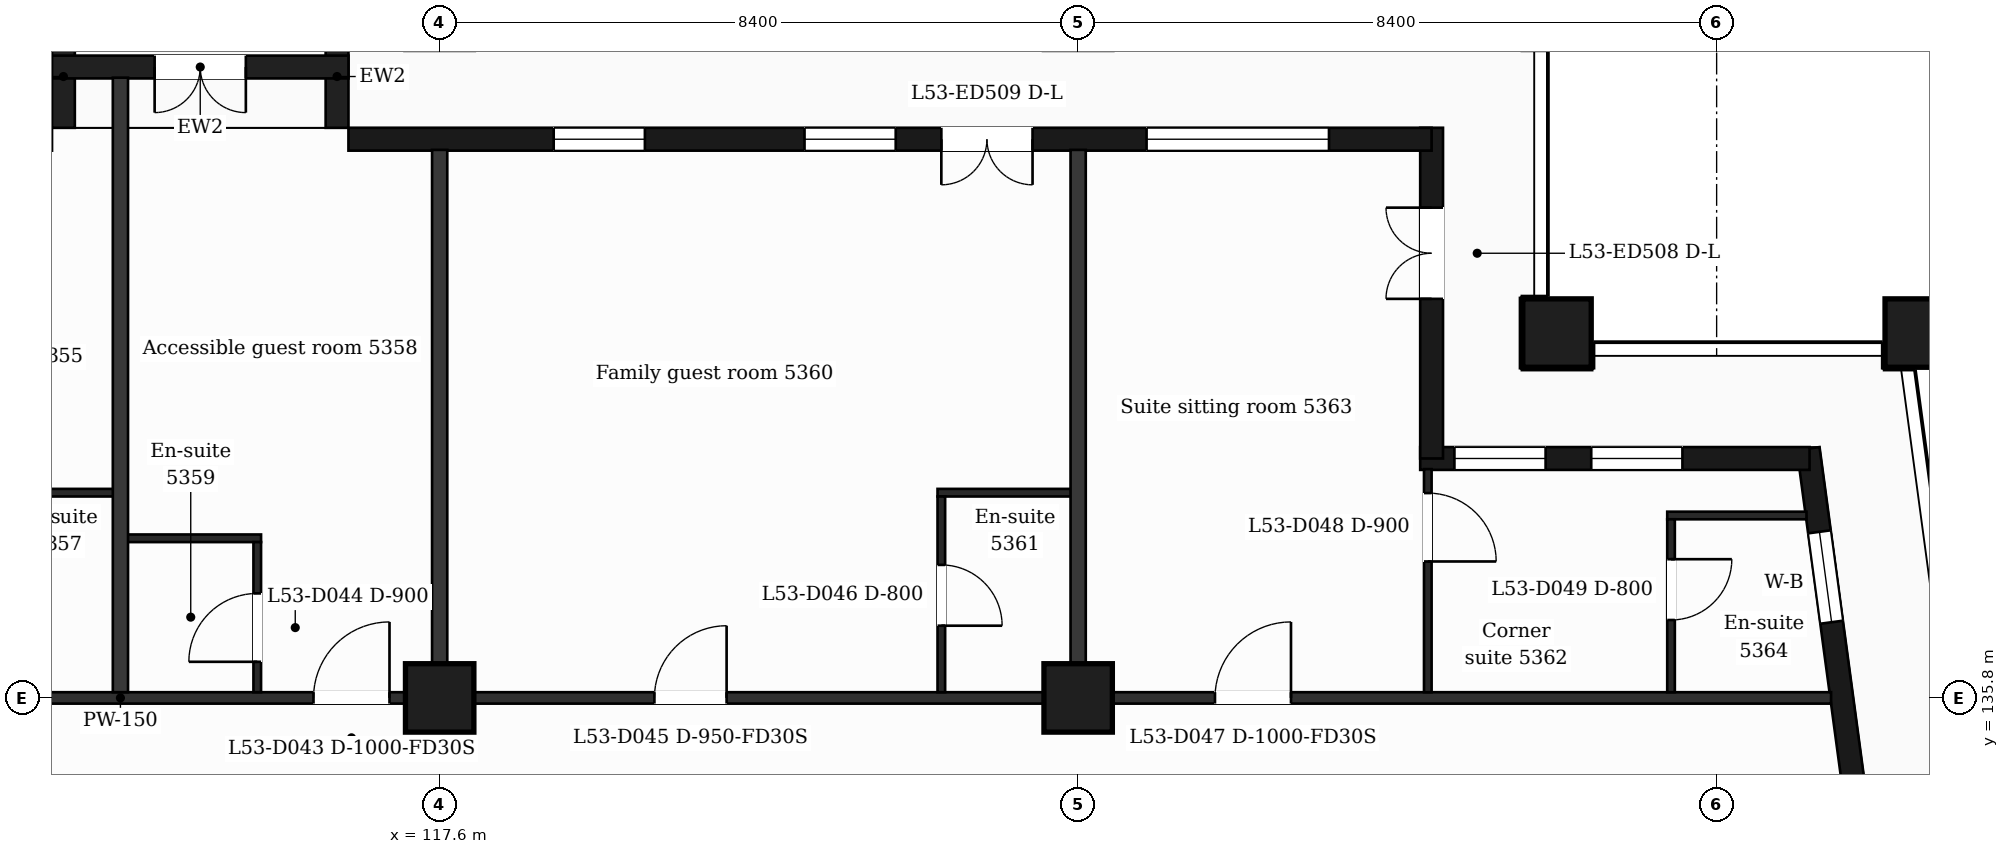
"""IFC4 building model, lengths in metres.
Left out: names, types, materials, properties, quantities, classifications, styles, units other than length and angle.
Written with IfcOpenShell. Run it as: python <this file> out.ifc"""

import sys

from ifc_helpers import new_model, si_unit, direction, frame, frame_2d, origin, origin_2d, place, context, subcontext, project, spatial, rectangle, extrude, element, fill, save


model = new_model("IFC4")
c1 = context("Model", 3, precision=1e-05, world=origin(), true_north=direction((0.0, 1.0)))
c2 = subcontext(c1, "Body", "Model", "MODEL_VIEW")
j1 = project(units=[si_unit("LENGTHUNIT", "METRE"), si_unit("PLANEANGLEUNIT", "RADIAN")], contexts=[c1])
p1 = place(None, origin())
s1 = spatial("IfcSite", under=j1, at=p1, CompositionType="ELEMENT")
p2 = place(p1, origin())
s2 = spatial("IfcBuilding", under=s1, at=p2, CompositionType="ELEMENT")
p3 = place(p2, frame((0.0, 0.0, 220.7)))
s3 = spatial("IfcBuildingStorey", under=s2, at=p3, CompositionType="ELEMENT", Elevation=220.7)
for number, where, z_axis, x_axis in (
    (1, (132.3, 140.6, 0.0), (0.0, 0.0, 1.0), (1.0, 0.0, 0.0)),
    (2, (137.065, 140.6, 0.0), (0.0, 0.0, 1.0), (1.0, 0.0, 0.0)),
    (3, (117.6, 135.8, 0.0), (0.0, 0.0, 1.0), (1.0, 0.0, 0.0)),
    (4, (126.0, 135.8, 0.0), (0.0, 0.0, 1.0), (1.0, 0.0, 0.0)),
):
    element("IfcColumn", number, at=place(p3, frame(where, z_axis=z_axis, x_axis=x_axis)), inside=s3, PredefinedType="COLUMN", context=c2, shape_type="SweptSolid", body=[
        extrude(rectangle(XDim=0.9, YDim=0.9, at=origin_2d()), origin(), (0.0, 0.0, 1.0), 3.7),
    ])
p4 = place(p3, frame((136.504, 132.4, 0.0), z_axis=(0.0, 0.0, 1.0), x_axis=(-0.133399697462, 0.99106231929, 0.0)))
e5 = element("IfcWall", 5, at=p4, inside=s3, PredefinedType="SOLIDWALL", context=c2, shape_type="SweptSolid", body=[
    extrude(rectangle(XDim=6.74, YDim=0.3, at=frame_2d((3.37, 0.0))), origin(), (0.0, 0.0, 1.0), 3.38),
])
p5 = place(p4, frame((1.115, 0.0, 0.0)))
e6 = element("IfcOpeningElement", 6, at=p5, cuts=e5, PredefinedType="OPENING", context=c2, shape_type="SweptSolid", body=[
    extrude(rectangle(XDim=1.2, YDim=2.4, at=frame_2d((0.6, 1.2))), frame((0.0, 0.16, 0.0), z_axis=(0.0, -1.0, 0.0), x_axis=(1.0, 0.0, 0.0)), (0.0, 0.0, 1.0), 0.32),
])
p6 = place(p4, frame((4.436, 0.0, 0.9)))
e7 = element("IfcOpeningElement", 7, at=p6, cuts=e5, PredefinedType="OPENING", context=c2, shape_type="SweptSolid", body=[
    extrude(rectangle(XDim=1.2, YDim=2.1, at=frame_2d((0.6, 1.05))), frame((0.0, 0.16, 0.0), z_axis=(0.0, -1.0, 0.0), x_axis=(1.0, 0.0, 0.0)), (0.0, 0.0, 1.0), 0.32),
])
p7 = place(p3, frame((135.623, 138.95, 0.0), z_axis=(0.0, 0.0, 1.0), x_axis=(-1.0, 0.0, 0.0)))
e8 = element("IfcWall", 8, at=p7, inside=s3, PredefinedType="SOLIDWALL", context=c2, shape_type="SweptSolid", body=[
    extrude(rectangle(XDim=5.123, YDim=0.3, at=frame_2d((2.561, 0.0))), origin(), (0.0, 0.0, 1.0), 3.38),
])
p8 = place(p7, frame((1.673, 0.0, 0.9)))
e9 = element("IfcOpeningElement", 9, at=p8, cuts=e8, PredefinedType="OPENING", context=c2, shape_type="SweptSolid", body=[
    extrude(rectangle(XDim=1.2, YDim=2.1, at=frame_2d((0.6, 1.05))), frame((0.0, 0.16, 0.0), z_axis=(0.0, -1.0, 0.0), x_axis=(1.0, 0.0, 0.0)), (0.0, 0.0, 1.0), 0.32),
])
p9 = place(p7, frame((3.473, 0.0, 0.9)))
e10 = element("IfcOpeningElement", 10, at=p9, cuts=e8, PredefinedType="OPENING", context=c2, shape_type="SweptSolid", body=[
    extrude(rectangle(XDim=1.2, YDim=2.1, at=frame_2d((0.6, 1.05))), frame((0.0, 0.16, 0.0), z_axis=(0.0, -1.0, 0.0), x_axis=(1.0, 0.0, 0.0)), (0.0, 0.0, 1.0), 0.32),
])
p10 = place(p3, frame((130.65, 138.95, 0.0), z_axis=(0.0, 0.0, 1.0), x_axis=(0.0, 1.0, 0.0)))
e11 = element("IfcWall", 11, at=p10, inside=s3, PredefinedType="SOLIDWALL", context=c2, shape_type="SweptSolid", body=[
    extrude(rectangle(XDim=4.35, YDim=0.3, at=frame_2d((2.175, 0.0))), origin(), (0.0, 0.0, 1.0), 3.38),
])
p11 = place(p10, frame((2.1, 0.0, 0.0)))
e12 = element("IfcOpeningElement", 12, at=p11, cuts=e11, PredefinedType="OPENING", context=c2, shape_type="SweptSolid", body=[
    extrude(rectangle(XDim=1.2, YDim=2.4, at=frame_2d((0.6, 1.2))), frame((0.0, 0.16, 0.0), z_axis=(0.0, -1.0, 0.0), x_axis=(1.0, 0.0, 0.0)), (0.0, 0.0, 1.0), 0.32),
])
p12 = place(p3, frame((130.65, 143.15, 0.0), z_axis=(0.0, 0.0, 1.0), x_axis=(-1.0, 0.0, 0.0)))
e13 = element("IfcWall", 13, at=p12, inside=s3, PredefinedType="SOLIDWALL", context=c2, shape_type="SweptSolid", body=[
    extrude(rectangle(XDim=14.25, YDim=0.3, at=frame_2d((7.125, 0.0))), origin(), (0.0, 0.0, 1.0), 3.38),
])
p13 = place(p12, frame((1.35, 0.0, 0.9)))
e14 = element("IfcOpeningElement", 14, at=p13, cuts=e13, PredefinedType="OPENING", context=c2, shape_type="SweptSolid", body=[
    extrude(rectangle(XDim=2.4, YDim=2.1, at=frame_2d((1.2, 1.05))), frame((0.0, 0.16, 0.0), z_axis=(0.0, -1.0, 0.0), x_axis=(1.0, 0.0, 0.0)), (0.0, 0.0, 1.0), 0.32),
])
p14 = place(p12, frame((5.25, 0.0, 0.0)))
e15 = element("IfcOpeningElement", 15, at=p14, cuts=e13, PredefinedType="OPENING", context=c2, shape_type="SweptSolid", body=[
    extrude(rectangle(XDim=1.2, YDim=2.4, at=frame_2d((0.6, 1.2))), frame((0.0, 0.16, 0.0), z_axis=(0.0, -1.0, 0.0), x_axis=(1.0, 0.0, 0.0)), (0.0, 0.0, 1.0), 0.32),
])
p15 = place(p12, frame((7.05, 0.0, 0.9)))
e16 = element("IfcOpeningElement", 16, at=p15, cuts=e13, PredefinedType="OPENING", context=c2, shape_type="SweptSolid", body=[
    extrude(rectangle(XDim=1.2, YDim=2.1, at=frame_2d((0.6, 1.05))), frame((0.0, 0.16, 0.0), z_axis=(0.0, -1.0, 0.0), x_axis=(1.0, 0.0, 0.0)), (0.0, 0.0, 1.0), 0.32),
])
p16 = place(p12, frame((10.35, 0.0, 0.9)))
e17 = element("IfcOpeningElement", 17, at=p16, cuts=e13, PredefinedType="OPENING", context=c2, shape_type="SweptSolid", body=[
    extrude(rectangle(XDim=1.2, YDim=2.1, at=frame_2d((0.6, 1.05))), frame((0.0, 0.16, 0.0), z_axis=(0.0, -1.0, 0.0), x_axis=(1.0, 0.0, 0.0)), (0.0, 0.0, 1.0), 0.32),
])
for number, where, z_axis, x_axis in (
    (18, (116.25, 143.3, 0.0), (0.0, 0.0, 1.0), (0.0, 1.0, 0.0)),
    (19, (112.65, 143.3, 0.0), (0.0, 0.0, 1.0), (0.0, 1.0, 0.0)),
):
    element("IfcWall", number, at=place(p3, frame(where, z_axis=z_axis, x_axis=x_axis)), inside=s3, PredefinedType="SOLIDWALL", context=c2, shape_type="SweptSolid", body=[
        extrude(rectangle(XDim=1.35, YDim=0.3, at=frame_2d((0.675, 0.0))), origin(), (0.0, 0.0, 1.0), 3.38),
    ])
p17 = place(p3, frame((116.4, 144.1, 0.0), z_axis=(0.0, 0.0, 1.0), x_axis=(-1.0, 0.0, 0.0)))
e20 = element("IfcWall", 20, at=p17, inside=s3, PredefinedType="SOLIDWALL", context=c2, shape_type="SweptSolid", body=[
    extrude(rectangle(XDim=3.9, YDim=0.3, at=frame_2d((1.95, 0.0))), origin(), (0.0, 0.0, 1.0), 3.38),
])
p18 = place(p17, frame((1.35, 0.0, 0.0)))
e21 = element("IfcOpeningElement", 21, at=p18, cuts=e20, PredefinedType="OPENING", context=c2, shape_type="SweptSolid", body=[
    extrude(rectangle(XDim=1.2, YDim=2.4, at=frame_2d((0.6, 1.2))), frame((0.0, 0.16, 0.0), z_axis=(0.0, -1.0, 0.0), x_axis=(1.0, 0.0, 0.0)), (0.0, 0.0, 1.0), 0.32),
])
p19 = place(p3, frame((90.895, 135.8, 0.0), z_axis=(0.0, 0.0, 1.0), x_axis=(1.0, 0.0, 0.0)))
e22 = element("IfcWall", 22, at=p19, inside=s3, PredefinedType="PARTITIONING", context=c2, shape_type="SweptSolid", body=[
    extrude(rectangle(XDim=45.011, YDim=0.15, at=frame_2d((22.505, 0.0))), origin(), (0.0, 0.0, 1.0), 3.38),
])
p20 = place(p19, frame((6.906, 0.0, 0.0)))
e23 = element("IfcOpeningElement", 23, at=p20, cuts=e22, PredefinedType="OPENING", context=c2, shape_type="SweptSolid", body=[
    extrude(rectangle(XDim=1.0, YDim=2.1, at=frame_2d((0.5, 1.05))), frame((0.0, 0.085, 0.0), z_axis=(0.0, -1.0, 0.0), x_axis=(1.0, 0.0, 0.0)), (0.0, 0.0, 1.0), 0.17),
])
p21 = place(p19, frame((15.281, 0.0, 0.0)))
e24 = element("IfcOpeningElement", 24, at=p21, cuts=e22, PredefinedType="OPENING", context=c2, shape_type="SweptSolid", body=[
    extrude(rectangle(XDim=1.0, YDim=2.1, at=frame_2d((0.5, 1.05))), frame((0.0, 0.085, 0.0), z_axis=(0.0, -1.0, 0.0), x_axis=(1.0, 0.0, 0.0)), (0.0, 0.0, 1.0), 0.17),
])
p22 = place(p19, frame((25.045, 0.0, 0.0)))
e25 = element("IfcOpeningElement", 25, at=p22, cuts=e22, PredefinedType="OPENING", context=c2, shape_type="SweptSolid", body=[
    extrude(rectangle(XDim=1.0, YDim=2.1, at=frame_2d((0.5, 1.05))), frame((0.0, 0.085, 0.0), z_axis=(0.0, -1.0, 0.0), x_axis=(1.0, 0.0, 0.0)), (0.0, 0.0, 1.0), 0.17),
])
p23 = place(p19, frame((29.531, 0.0, 0.0)))
e26 = element("IfcOpeningElement", 26, at=p23, cuts=e22, PredefinedType="OPENING", context=c2, shape_type="SweptSolid", body=[
    extrude(rectangle(XDim=0.95, YDim=2.1, at=frame_2d((0.475, 1.05))), frame((0.0, 0.085, 0.0), z_axis=(0.0, -1.0, 0.0), x_axis=(1.0, 0.0, 0.0)), (0.0, 0.0, 1.0), 0.17),
])
p24 = place(p19, frame((36.906, 0.0, 0.0)))
e27 = element("IfcOpeningElement", 27, at=p24, cuts=e22, PredefinedType="OPENING", context=c2, shape_type="SweptSolid", body=[
    extrude(rectangle(XDim=1.0, YDim=2.1, at=frame_2d((0.5, 1.05))), frame((0.0, 0.085, 0.0), z_axis=(0.0, -1.0, 0.0), x_axis=(1.0, 0.0, 0.0)), (0.0, 0.0, 1.0), 0.17),
])
p25 = place(p3, frame((113.4, 137.9, 0.0), z_axis=(0.0, 0.0, 1.0), x_axis=(1.0, 0.0, 0.0)))
e28 = element("IfcWall", 28, at=p25, inside=s3, PredefinedType="PARTITIONING", context=c2, shape_type="SweptSolid", body=[
    extrude(rectangle(XDim=1.85, YDim=0.1, at=frame_2d((0.925, 0.0))), origin(), (0.0, 0.0, 1.0), 3.38),
])
p26 = place(p3, frame((133.75, 138.2, 0.0), z_axis=(0.0, 0.0, 1.0), x_axis=(1.0, 0.0, 0.0)))
e29 = element("IfcWall", 29, at=p26, inside=s3, PredefinedType="PARTITIONING", context=c2, shape_type="SweptSolid", body=[
    extrude(rectangle(XDim=1.832, YDim=0.1, at=frame_2d((0.916, 0.0))), origin(), (0.0, 0.0, 1.0), 3.38),
])
p27 = place(p3, frame((111.55, 138.5, 0.0), z_axis=(0.0, 0.0, 1.0), x_axis=(1.0, 0.0, 0.0)))
e30 = element("IfcWall", 30, at=p27, inside=s3, PredefinedType="PARTITIONING", context=c2, shape_type="SweptSolid", body=[
    extrude(rectangle(XDim=1.85, YDim=0.1, at=frame_2d((0.925, 0.0))), origin(), (0.0, 0.0, 1.0), 3.38),
])
p28 = place(p3, frame((124.15, 138.5, 0.0), z_axis=(0.0, 0.0, 1.0), x_axis=(1.0, 0.0, 0.0)))
e31 = element("IfcWall", 31, at=p28, inside=s3, PredefinedType="PARTITIONING", context=c2, shape_type="SweptSolid", body=[
    extrude(rectangle(XDim=1.85, YDim=0.1, at=frame_2d((0.925, 0.0))), origin(), (0.0, 0.0, 1.0), 3.38),
])
p29 = place(p3, frame((113.4, 135.875, 0.0), z_axis=(0.0, 0.0, 1.0), x_axis=(0.0, 1.0, 0.0)))
e32 = element("IfcWall", 32, at=p29, inside=s3, PredefinedType="PARTITIONING", context=c2, shape_type="SweptSolid", body=[
    extrude(rectangle(XDim=8.085, YDim=0.2, at=frame_2d((4.042, 0.0))), origin(), (0.0, 0.0, 1.0), 3.38),
])
p30 = place(p3, frame((115.2, 135.875, 0.0), z_axis=(0.0, 0.0, 1.0), x_axis=(0.0, 1.0, 0.0)))
e33 = element("IfcWall", 33, at=p30, inside=s3, PredefinedType="PARTITIONING", context=c2, shape_type="SweptSolid", body=[
    extrude(rectangle(XDim=1.975, YDim=0.1, at=frame_2d((0.988, 0.0))), origin(), (0.0, 0.0, 1.0), 3.38),
])
p31 = place(p30, frame((0.4, 0.0, 0.0)))
e34 = element("IfcOpeningElement", 34, at=p31, cuts=e33, PredefinedType="OPENING", context=c2, shape_type="SweptSolid", body=[
    extrude(rectangle(XDim=0.9, YDim=2.1, at=frame_2d((0.45, 1.05))), frame((0.0, 0.06, 0.0), z_axis=(0.0, -1.0, 0.0), x_axis=(1.0, 0.0, 0.0)), (0.0, 0.0, 1.0), 0.12),
])
p32 = place(p3, frame((117.6, 135.875, 0.0), z_axis=(0.0, 0.0, 1.0), x_axis=(0.0, 1.0, 0.0)))
e35 = element("IfcWall", 35, at=p32, inside=s3, PredefinedType="PARTITIONING", context=c2, shape_type="SweptSolid", body=[
    extrude(rectangle(XDim=7.135, YDim=0.2, at=frame_2d((3.567, 0.0))), origin(), (0.0, 0.0, 1.0), 3.38),
])
p33 = place(p3, frame((124.2, 135.875, 0.0), z_axis=(0.0, 0.0, 1.0), x_axis=(0.0, 1.0, 0.0)))
e36 = element("IfcWall", 36, at=p33, inside=s3, PredefinedType="PARTITIONING", context=c2, shape_type="SweptSolid", body=[
    extrude(rectangle(XDim=2.575, YDim=0.1, at=frame_2d((1.288, 0.0))), origin(), (0.0, 0.0, 1.0), 3.38),
])
p34 = place(p33, frame((0.875, 0.0, 0.0)))
e37 = element("IfcOpeningElement", 37, at=p34, cuts=e36, PredefinedType="OPENING", context=c2, shape_type="SweptSolid", body=[
    extrude(rectangle(XDim=0.8, YDim=2.1, at=frame_2d((0.4, 1.05))), frame((0.0, 0.06, 0.0), z_axis=(0.0, -1.0, 0.0), x_axis=(1.0, 0.0, 0.0)), (0.0, 0.0, 1.0), 0.12),
])
p35 = place(p3, frame((126.0, 135.875, 0.0), z_axis=(0.0, 0.0, 1.0), x_axis=(0.0, 1.0, 0.0)))
e38 = element("IfcWall", 38, at=p35, inside=s3, PredefinedType="PARTITIONING", context=c2, shape_type="SweptSolid", body=[
    extrude(rectangle(XDim=7.135, YDim=0.2, at=frame_2d((3.567, 0.0))), origin(), (0.0, 0.0, 1.0), 3.38),
])
p36 = place(p3, frame((130.6, 135.875, 0.0), z_axis=(0.0, 0.0, 1.0), x_axis=(0.0, 1.0, 0.0)))
e39 = element("IfcWall", 39, at=p36, inside=s3, PredefinedType="PARTITIONING", context=c2, shape_type="SweptSolid", body=[
    extrude(rectangle(XDim=2.935, YDim=0.1, at=frame_2d((1.468, 0.0))), origin(), (0.0, 0.0, 1.0), 3.38),
])
p37 = place(p36, frame((1.72, 0.0, 0.0)))
e40 = element("IfcOpeningElement", 40, at=p37, cuts=e39, PredefinedType="OPENING", context=c2, shape_type="SweptSolid", body=[
    extrude(rectangle(XDim=0.9, YDim=2.1, at=frame_2d((0.45, 1.05))), frame((0.0, 0.06, 0.0), z_axis=(0.0, -1.0, 0.0), x_axis=(1.0, 0.0, 0.0)), (0.0, 0.0, 1.0), 0.12),
])
p38 = place(p3, frame((133.8, 135.875, 0.0), z_axis=(0.0, 0.0, 1.0), x_axis=(0.0, 1.0, 0.0)))
e41 = element("IfcWall", 41, at=p38, inside=s3, PredefinedType="PARTITIONING", context=c2, shape_type="SweptSolid", body=[
    extrude(rectangle(XDim=2.275, YDim=0.1, at=frame_2d((1.137, 0.0))), origin(), (0.0, 0.0, 1.0), 3.38),
])
p39 = place(p38, frame((0.95, 0.0, 0.0)))
e42 = element("IfcOpeningElement", 42, at=p39, cuts=e41, PredefinedType="OPENING", context=c2, shape_type="SweptSolid", body=[
    extrude(rectangle(XDim=0.8, YDim=2.1, at=frame_2d((0.4, 1.05))), frame((0.0, 0.06, 0.0), z_axis=(0.0, -1.0, 0.0), x_axis=(1.0, 0.0, 0.0)), (0.0, 0.0, 1.0), 0.12),
])
p40 = place(p6, origin())
e43 = element("IfcWindow", 43, at=p40, inside=s3, PartitioningType="SINGLE_PANEL", PredefinedType="WINDOW", context=c2, shape_type="SweptSolid", body=[
    extrude(rectangle(XDim=1.2, YDim=2.1, at=frame_2d((0.6, 1.05))), frame((0.0, 0.03, 0.0), z_axis=(0.0, -1.0, 0.0), x_axis=(1.0, 0.0, 0.0)), (0.0, 0.0, 1.0), 0.06),
])
fill(e7, e43)
p41 = place(p8, origin())
e44 = element("IfcWindow", 44, at=p41, inside=s3, PartitioningType="SINGLE_PANEL", PredefinedType="WINDOW", context=c2, shape_type="SweptSolid", body=[
    extrude(rectangle(XDim=1.2, YDim=2.1, at=frame_2d((0.6, 1.05))), frame((0.0, 0.03, 0.0), z_axis=(0.0, -1.0, 0.0), x_axis=(1.0, 0.0, 0.0)), (0.0, 0.0, 1.0), 0.06),
])
fill(e9, e44)
p42 = place(p9, origin())
e45 = element("IfcWindow", 45, at=p42, inside=s3, PartitioningType="SINGLE_PANEL", PredefinedType="WINDOW", context=c2, shape_type="SweptSolid", body=[
    extrude(rectangle(XDim=1.2, YDim=2.1, at=frame_2d((0.6, 1.05))), frame((0.0, 0.03, 0.0), z_axis=(0.0, -1.0, 0.0), x_axis=(1.0, 0.0, 0.0)), (0.0, 0.0, 1.0), 0.06),
])
fill(e10, e45)
p43 = place(p11, origin())
e46 = element("IfcDoor", 46, at=p43, inside=s3, OperationType="DOUBLE_DOOR_SINGLE_SWING", PredefinedType="DOOR", context=c2, shape_type="SweptSolid", body=[
    extrude(rectangle(XDim=1.2, YDim=2.4, at=frame_2d((0.6, 1.2))), frame((0.0, 0.025, 0.0), z_axis=(0.0, -1.0, 0.0), x_axis=(1.0, 0.0, 0.0)), (0.0, 0.0, 1.0), 0.05),
])
fill(e12, e46)
p44 = place(p13, origin())
e47 = element("IfcWindow", 47, at=p44, inside=s3, PartitioningType="SINGLE_PANEL", PredefinedType="WINDOW", context=c2, shape_type="SweptSolid", body=[
    extrude(rectangle(XDim=2.4, YDim=2.1, at=frame_2d((1.2, 1.05))), frame((0.0, 0.03, 0.0), z_axis=(0.0, -1.0, 0.0), x_axis=(1.0, 0.0, 0.0)), (0.0, 0.0, 1.0), 0.06),
])
fill(e14, e47)
p45 = place(p14, origin())
e48 = element("IfcDoor", 48, at=p45, inside=s3, OperationType="DOUBLE_DOOR_SINGLE_SWING", PredefinedType="DOOR", context=c2, shape_type="SweptSolid", body=[
    extrude(rectangle(XDim=1.2, YDim=2.4, at=frame_2d((0.6, 1.2))), frame((0.0, 0.025, 0.0), z_axis=(0.0, -1.0, 0.0), x_axis=(1.0, 0.0, 0.0)), (0.0, 0.0, 1.0), 0.05),
])
fill(e15, e48)
p46 = place(p15, origin())
e49 = element("IfcWindow", 49, at=p46, inside=s3, PartitioningType="SINGLE_PANEL", PredefinedType="WINDOW", context=c2, shape_type="SweptSolid", body=[
    extrude(rectangle(XDim=1.2, YDim=2.1, at=frame_2d((0.6, 1.05))), frame((0.0, 0.03, 0.0), z_axis=(0.0, -1.0, 0.0), x_axis=(1.0, 0.0, 0.0)), (0.0, 0.0, 1.0), 0.06),
])
fill(e16, e49)
p47 = place(p16, origin())
e50 = element("IfcWindow", 50, at=p47, inside=s3, PartitioningType="SINGLE_PANEL", PredefinedType="WINDOW", context=c2, shape_type="SweptSolid", body=[
    extrude(rectangle(XDim=1.2, YDim=2.1, at=frame_2d((0.6, 1.05))), frame((0.0, 0.03, 0.0), z_axis=(0.0, -1.0, 0.0), x_axis=(1.0, 0.0, 0.0)), (0.0, 0.0, 1.0), 0.06),
])
fill(e17, e50)
p48 = place(p18, origin())
e51 = element("IfcDoor", 51, at=p48, inside=s3, OperationType="DOUBLE_DOOR_SINGLE_SWING", PredefinedType="DOOR", context=c2, shape_type="SweptSolid", body=[
    extrude(rectangle(XDim=1.2, YDim=2.4, at=frame_2d((0.6, 1.2))), frame((0.0, 0.025, 0.0), z_axis=(0.0, -1.0, 0.0), x_axis=(1.0, 0.0, 0.0)), (0.0, 0.0, 1.0), 0.05),
])
fill(e21, e51)
p49 = place(p22, origin())
e52 = element("IfcDoor", 52, at=p49, inside=s3, OperationType="SINGLE_SWING_RIGHT", PredefinedType="DOOR", context=c2, shape_type="SweptSolid", body=[
    extrude(rectangle(XDim=1.0, YDim=2.1, at=frame_2d((0.5, 1.05))), frame((0.0, 0.025, 0.0), z_axis=(0.0, -1.0, 0.0), x_axis=(1.0, 0.0, 0.0)), (0.0, 0.0, 1.0), 0.05),
])
fill(e25, e52)
p50 = place(p31, origin())
e53 = element("IfcDoor", 53, at=p50, inside=s3, OperationType="SINGLE_SWING_LEFT", PredefinedType="DOOR", context=c2, shape_type="SweptSolid", body=[
    extrude(rectangle(XDim=0.9, YDim=2.1, at=frame_2d((0.45, 1.05))), frame((0.0, 0.025, 0.0), z_axis=(0.0, -1.0, 0.0), x_axis=(1.0, 0.0, 0.0)), (0.0, 0.0, 1.0), 0.05),
])
fill(e34, e53)
p51 = place(p23, origin())
e54 = element("IfcDoor", 54, at=p51, inside=s3, OperationType="SINGLE_SWING_RIGHT", PredefinedType="DOOR", context=c2, shape_type="SweptSolid", body=[
    extrude(rectangle(XDim=0.95, YDim=2.1, at=frame_2d((0.475, 1.05))), frame((0.0, 0.025, 0.0), z_axis=(0.0, -1.0, 0.0), x_axis=(1.0, 0.0, 0.0)), (0.0, 0.0, 1.0), 0.05),
])
fill(e26, e54)
p52 = place(p34, origin())
e55 = element("IfcDoor", 55, at=p52, inside=s3, OperationType="SINGLE_SWING_LEFT", PredefinedType="DOOR", context=c2, shape_type="SweptSolid", body=[
    extrude(rectangle(XDim=0.8, YDim=2.1, at=frame_2d((0.4, 1.05))), frame((0.0, 0.025, 0.0), z_axis=(0.0, -1.0, 0.0), x_axis=(1.0, 0.0, 0.0)), (0.0, 0.0, 1.0), 0.05),
])
fill(e37, e55)
p53 = place(p24, origin())
e56 = element("IfcDoor", 56, at=p53, inside=s3, OperationType="SINGLE_SWING_RIGHT", PredefinedType="DOOR", context=c2, shape_type="SweptSolid", body=[
    extrude(rectangle(XDim=1.0, YDim=2.1, at=frame_2d((0.5, 1.05))), frame((0.0, 0.025, 0.0), z_axis=(0.0, -1.0, 0.0), x_axis=(1.0, 0.0, 0.0)), (0.0, 0.0, 1.0), 0.05),
])
fill(e27, e56)
p54 = place(p37, origin())
e57 = element("IfcDoor", 57, at=p54, inside=s3, OperationType="SINGLE_SWING_LEFT", PredefinedType="DOOR", context=c2, shape_type="SweptSolid", body=[
    extrude(rectangle(XDim=0.9, YDim=2.1, at=frame_2d((0.45, 1.05))), frame((0.0, 0.025, 0.0), z_axis=(0.0, -1.0, 0.0), x_axis=(1.0, 0.0, 0.0)), (0.0, 0.0, 1.0), 0.05),
])
fill(e40, e57)
p55 = place(p39, origin())
e58 = element("IfcDoor", 58, at=p55, inside=s3, OperationType="SINGLE_SWING_RIGHT", PredefinedType="DOOR", context=c2, shape_type="SweptSolid", body=[
    extrude(rectangle(XDim=0.8, YDim=2.1, at=frame_2d((0.4, 1.05))), frame((0.0, 0.025, 0.0), z_axis=(0.0, -1.0, 0.0), x_axis=(1.0, 0.0, 0.0)), (0.0, 0.0, 1.0), 0.05),
])
fill(e42, e58)
save(model, sys.argv[1])
